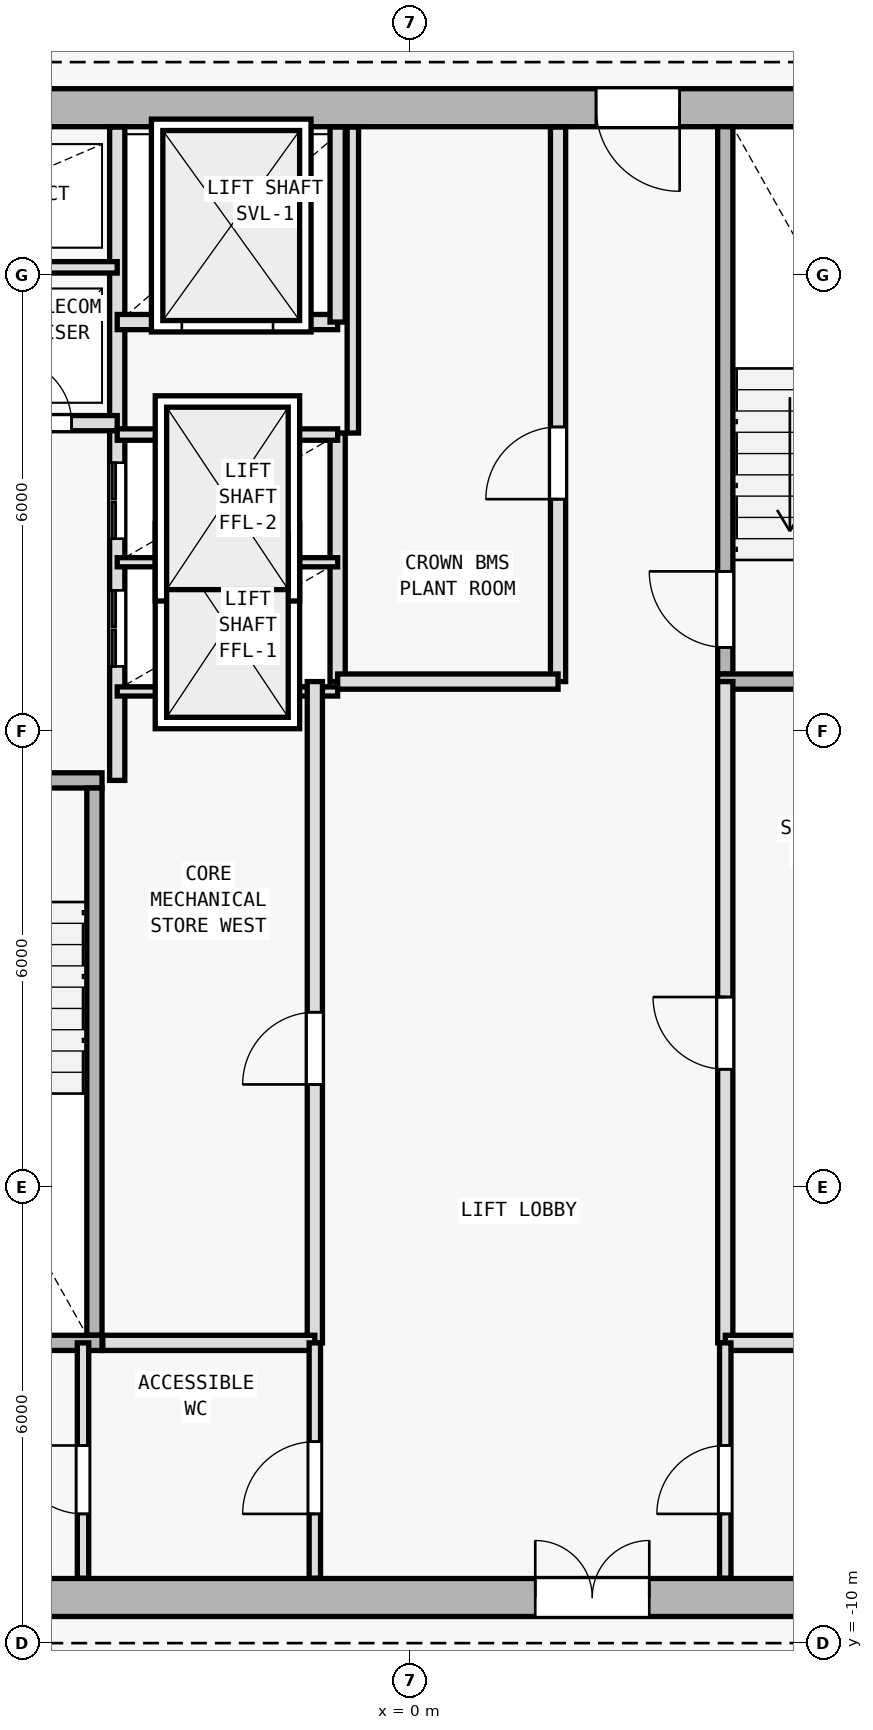
"""IFC4 building model, lengths in metres.
Left out: names, types, materials, properties, quantities, classifications, styles, units other than length and angle.
Written with IfcOpenShell. Run it as: python <this file> out.ifc"""

import sys

from ifc_helpers import new_model, si_unit, direction, frame, frame_2d, origin, origin_2d, place, context, subcontext, project, spatial, rectangle, i_section, extrude, element, fill, save


model = new_model("IFC4")
c1 = context("Model", 3, precision=1e-05, world=origin(), true_north=direction((0.0, 1.0)))
c2 = subcontext(c1, "Body", "Model", "MODEL_VIEW")
j1 = project(units=[si_unit("LENGTHUNIT", "METRE"), si_unit("PLANEANGLEUNIT", "RADIAN")], contexts=[c1])
p1 = place(None, origin())
s1 = spatial("IfcSite", under=j1, at=p1, CompositionType="ELEMENT")
p2 = place(p1, origin())
s2 = spatial("IfcBuilding", under=s1, at=p2, CompositionType="ELEMENT")
p3 = place(p2, frame((0.0, 0.0, 301.2)))
s3 = spatial("IfcBuildingStorey", under=s2, at=p3, CompositionType="ELEMENT", Elevation=301.2)
p4 = place(p3, frame((0.0, -9.4, 0.0), z_axis=(0.0, 0.0, 1.0), x_axis=(1.0, 0.0, 0.0)))
e1 = element("IfcColumn", 1, at=p4, inside=s3, PredefinedType="COLUMN", context=c2, shape_type="SweptSolid", body=[
    extrude(i_section(OverallWidth=0.374, OverallDepth=0.372, WebThickness=0.012, FlangeThickness=0.02, FilletRadius=0.015, at=origin_2d()), origin(), (0.0, 0.0, 1.0), 3.6),
])
p5 = place(p3, frame((-7.95, -9.4, 0.0), z_axis=(0.0, 0.0, 1.0), x_axis=(1.0, 0.0, 0.0)))
e2 = element("IfcWall", 2, at=p5, inside=s3, PredefinedType="SHEAR", context=c2, shape_type="SweptSolid", body=[
    extrude(rectangle(XDim=15.9, YDim=0.5, at=frame_2d((7.95, 0.0))), origin(), (0.0, 0.0, 1.0), 3.34),
])
p6 = place(p5, frame((9.6, 0.0, 0.0)))
e3 = element("IfcOpeningElement", 3, at=p6, cuts=e2, PredefinedType="OPENING", context=c2, shape_type="SweptSolid", body=[
    extrude(rectangle(XDim=1.5, YDim=2.2, at=frame_2d((0.75, 1.1))), frame((0.0, 0.26, 0.0), z_axis=(0.0, -1.0, 0.0), x_axis=(1.0, 0.0, 0.0)), (0.0, 0.0, 1.0), 0.52),
])
p7 = place(p3, frame((7.95, 10.2, 0.0), z_axis=(0.0, 0.0, 1.0), x_axis=(-1.0, 0.0, 0.0)))
e4 = element("IfcWall", 4, at=p7, inside=s3, PredefinedType="SHEAR", context=c2, shape_type="SweptSolid", body=[
    extrude(rectangle(XDim=15.9, YDim=0.5, at=frame_2d((7.95, 0.0))), origin(), (0.0, 0.0, 1.0), 3.34),
])
p8 = place(p7, frame((4.4, 0.0, 0.0)))
e5 = element("IfcOpeningElement", 5, at=p8, cuts=e4, PredefinedType="OPENING", context=c2, shape_type="SweptSolid", body=[
    extrude(rectangle(XDim=1.1, YDim=2.15, at=frame_2d((0.55, 1.075))), frame((0.0, 0.26, 0.0), z_axis=(0.0, -1.0, 0.0), x_axis=(1.0, 0.0, 0.0)), (0.0, 0.0, 1.0), 0.52),
])
p9 = place(p3, frame((-7.45, 1.35, 0.0), z_axis=(0.0, 0.0, 1.0), x_axis=(1.0, 0.0, 0.0)))
e6 = element("IfcWall", 6, at=p9, inside=s3, PredefinedType="SOLIDWALL", context=c2, shape_type="SweptSolid", body=[
    extrude(rectangle(XDim=3.4, YDim=0.2, at=frame_2d((1.7, 0.0))), origin(), (0.0, 0.0, 1.0), 3.34),
])
p10 = place(p9, frame((0.65, 0.0, 0.0)))
e7 = element("IfcOpeningElement", 7, at=p10, cuts=e6, PredefinedType="OPENING", context=c2, shape_type="SweptSolid", body=[
    extrude(rectangle(XDim=1.0, YDim=2.15, at=frame_2d((0.5, 1.075))), frame((0.0, 0.11, 0.0), z_axis=(0.0, -1.0, 0.0), x_axis=(1.0, 0.0, 0.0)), (0.0, 0.0, 1.0), 0.22),
])
p11 = place(p3, frame((-4.15, -5.95, 0.0), z_axis=(0.0, 0.0, 1.0), x_axis=(0.0, 1.0, 0.0)))
e8 = element("IfcWall", 8, at=p11, inside=s3, PredefinedType="SOLIDWALL", context=c2, shape_type="SweptSolid", body=[
    extrude(rectangle(XDim=7.2, YDim=0.2, at=frame_2d((3.6, 0.0))), origin(), (0.0, 0.0, 1.0), 3.34),
])
p12 = place(p3, frame((-3.85, 1.35, 0.0), z_axis=(0.0, 0.0, 1.0), x_axis=(0.0, 1.0, 0.0)))
e9 = element("IfcWall", 9, at=p12, inside=s3, PredefinedType="SOLIDWALL", context=c2, shape_type="SweptSolid", body=[
    extrude(rectangle(XDim=8.595, YDim=0.2, at=frame_2d((4.297, 0.0))), origin(), (0.0, 0.0, 1.0), 3.34),
])
p13 = place(p12, frame((1.5, 0.0, 0.0)))
e10 = element("IfcOpeningElement", 10, at=p13, cuts=e9, PredefinedType="OPENING", context=c2, shape_type="SweptSolid", body=[
    extrude(rectangle(XDim=1.0, YDim=2.15, at=frame_2d((0.5, 1.075))), frame((0.0, 0.11, 0.0), z_axis=(0.0, -1.0, 0.0), x_axis=(1.0, 0.0, 0.0)), (0.0, 0.0, 1.0), 0.22),
])
p14 = place(p12, frame((3.18, 0.0, 0.0)))
e11 = element("IfcOpeningElement", 11, at=p14, cuts=e9, PredefinedType="OPENING", context=c2, shape_type="SweptSolid", body=[
    extrude(rectangle(XDim=1.0, YDim=2.15, at=frame_2d((0.5, 1.075))), frame((0.0, 0.11, 0.0), z_axis=(0.0, -1.0, 0.0), x_axis=(1.0, 0.0, 0.0)), (0.0, 0.0, 1.0), 0.22),
])
p15 = place(p3, frame((-7.445, 6.05, 0.0), z_axis=(0.0, 0.0, 1.0), x_axis=(1.0, 0.0, 0.0)))
e12 = element("IfcWall", 12, at=p15, inside=s3, PredefinedType="SOLIDWALL", context=c2, shape_type="SweptSolid", body=[
    extrude(rectangle(XDim=3.595, YDim=0.2, at=frame_2d((1.797, 0.0))), origin(), (0.0, 0.0, 1.0), 3.34),
])
p16 = place(p15, frame((0.345, 0.0, 0.0)))
e13 = element("IfcOpeningElement", 13, at=p16, cuts=e12, PredefinedType="OPENING", context=c2, shape_type="SweptSolid", body=[
    extrude(rectangle(XDim=0.85, YDim=2.1, at=frame_2d((0.425, 1.05))), frame((0.0, 0.11, 0.0), z_axis=(0.0, -1.0, 0.0), x_axis=(1.0, 0.0, 0.0)), (0.0, 0.0, 1.0), 0.22),
])
p17 = place(p15, frame((2.145, 0.0, 0.0)))
e14 = element("IfcOpeningElement", 14, at=p17, cuts=e12, PredefinedType="OPENING", context=c2, shape_type="SweptSolid", body=[
    extrude(rectangle(XDim=0.85, YDim=2.1, at=frame_2d((0.425, 1.05))), frame((0.0, 0.11, 0.0), z_axis=(0.0, -1.0, 0.0), x_axis=(1.0, 0.0, 0.0)), (0.0, 0.0, 1.0), 0.22),
])
p18 = place(p3, frame((-7.445, 8.1, 0.0), z_axis=(0.0, 0.0, 1.0), x_axis=(1.0, 0.0, 0.0)))
e15 = element("IfcWall", 15, at=p18, inside=s3, PredefinedType="PARTITIONING", context=c2, shape_type="SweptSolid", body=[
    extrude(rectangle(XDim=3.595, YDim=0.15, at=frame_2d((1.797, 0.0))), origin(), (0.0, 0.0, 1.0), 3.34),
])
p19 = place(p3, frame((4.15, 2.75, 0.0), z_axis=(0.0, 0.0, 1.0), x_axis=(0.0, 1.0, 0.0)))
e16 = element("IfcWall", 16, at=p19, inside=s3, PredefinedType="SOLIDWALL", context=c2, shape_type="SweptSolid", body=[
    extrude(rectangle(XDim=7.2, YDim=0.2, at=frame_2d((3.6, 0.0))), origin(), (0.0, 0.0, 1.0), 3.34),
])
p20 = place(p19, frame((0.35, 0.0, 0.0)))
e17 = element("IfcOpeningElement", 17, at=p20, cuts=e16, PredefinedType="OPENING", context=c2, shape_type="SweptSolid", body=[
    extrude(rectangle(XDim=1.0, YDim=2.15, at=frame_2d((0.5, 1.075))), frame((0.0, 0.11, 0.0), z_axis=(0.0, -1.0, 0.0), x_axis=(1.0, 0.0, 0.0)), (0.0, 0.0, 1.0), 0.22),
])
p21 = place(p3, frame((4.05, 2.65, 0.0), z_axis=(0.0, 0.0, 1.0), x_axis=(1.0, 0.0, 0.0)))
e18 = element("IfcWall", 18, at=p21, inside=s3, PredefinedType="SOLIDWALL", context=c2, shape_type="SweptSolid", body=[
    extrude(rectangle(XDim=3.4, YDim=0.2, at=frame_2d((1.7, 0.0))), origin(), (0.0, 0.0, 1.0), 3.34),
])
p22 = place(p3, frame((-0.95, 2.65, 0.0), z_axis=(0.0, 0.0, 1.0), x_axis=(0.0, 1.0, 0.0)))
e19 = element("IfcWall", 19, at=p22, inside=s3, PredefinedType="SOLIDWALL", context=c2, shape_type="SweptSolid", body=[
    extrude(rectangle(XDim=3.27, YDim=0.2, at=frame_2d((1.635, 0.0))), origin(), (0.0, 0.0, 1.0), 3.34),
])
for number, where, z_axis, x_axis in (
    (20, (-3.85, 2.52, 0.0), (0.0, 0.0, 1.0), (1.0, 0.0, 0.0)),
    (21, (-3.85, 4.22, 0.0), (0.0, 0.0, 1.0), (1.0, 0.0, 0.0)),
):
    element("IfcWall", number, at=place(p3, frame(where, z_axis=z_axis, x_axis=x_axis)), inside=s3, PredefinedType="PARTITIONING", context=c2, shape_type="SweptSolid", body=[
        extrude(rectangle(XDim=2.9, YDim=0.12, at=frame_2d((1.45, 0.0))), origin(), (0.0, 0.0, 1.0), 3.34),
    ])
p23 = place(p3, frame((-3.85, 5.9, 0.0), z_axis=(0.0, 0.0, 1.0), x_axis=(1.0, 0.0, 0.0)))
e22 = element("IfcWall", 22, at=p23, inside=s3, PredefinedType="PARTITIONING", context=c2, shape_type="SweptSolid", body=[
    extrude(rectangle(XDim=2.9, YDim=0.15, at=frame_2d((1.45, 0.0))), origin(), (0.0, 0.0, 1.0), 3.34),
])
p24 = place(p3, frame((-3.85, 7.38, 0.0), z_axis=(0.0, 0.0, 1.0), x_axis=(1.0, 0.0, 0.0)))
e23 = element("IfcWall", 23, at=p24, inside=s3, PredefinedType="SOLIDWALL", context=c2, shape_type="SweptSolid", body=[
    extrude(rectangle(XDim=2.9, YDim=0.2, at=frame_2d((1.45, 0.0))), origin(), (0.0, 0.0, 1.0), 3.34),
])
p25 = place(p24, frame((0.85, 0.0, 0.0)))
e24 = element("IfcOpeningElement", 24, at=p25, cuts=e23, PredefinedType="OPENING", context=c2, shape_type="SweptSolid", body=[
    extrude(rectangle(XDim=1.2, YDim=2.2, at=frame_2d((0.6, 1.1))), frame((0.0, 0.11, 0.0), z_axis=(0.0, -1.0, 0.0), x_axis=(1.0, 0.0, 0.0)), (0.0, 0.0, 1.0), 0.22),
])
p26 = place(p3, frame((-0.95, 7.38, 0.0), z_axis=(0.0, 0.0, 1.0), x_axis=(0.0, 1.0, 0.0)))
e25 = element("IfcWall", 25, at=p26, inside=s3, PredefinedType="SOLIDWALL", context=c2, shape_type="SweptSolid", body=[
    extrude(rectangle(XDim=2.565, YDim=0.2, at=frame_2d((1.283, 0.0))), origin(), (0.0, 0.0, 1.0), 3.34),
])
p27 = place(p3, frame((4.15, -6.05, 0.0), z_axis=(0.0, 0.0, 1.0), x_axis=(0.0, 1.0, 0.0)))
e26 = element("IfcWall", 26, at=p27, inside=s3, PredefinedType="SOLIDWALL", context=c2, shape_type="SweptSolid", body=[
    extrude(rectangle(XDim=8.7, YDim=0.2, at=frame_2d((4.35, 0.0))), origin(), (0.0, 0.0, 1.0), 3.34),
])
p28 = place(p27, frame((3.6, 0.0, 0.0)))
e27 = element("IfcOpeningElement", 27, at=p28, cuts=e26, PredefinedType="OPENING", context=c2, shape_type="SweptSolid", body=[
    extrude(rectangle(XDim=0.95, YDim=2.1, at=frame_2d((0.475, 1.05))), frame((0.0, 0.11, 0.0), z_axis=(0.0, -1.0, 0.0), x_axis=(1.0, 0.0, 0.0)), (0.0, 0.0, 1.0), 0.22),
])
p29 = place(p3, frame((-1.25, -6.05, 0.0), z_axis=(0.0, 0.0, 1.0), x_axis=(0.0, 1.0, 0.0)))
e28 = element("IfcWall", 28, at=p29, inside=s3, PredefinedType="SOLIDWALL", context=c2, shape_type="SweptSolid", body=[
    extrude(rectangle(XDim=8.7, YDim=0.2, at=frame_2d((4.35, 0.0))), origin(), (0.0, 0.0, 1.0), 3.34),
])
p30 = place(p29, frame((3.4, 0.0, 0.0)))
e29 = element("IfcOpeningElement", 29, at=p30, cuts=e28, PredefinedType="OPENING", context=c2, shape_type="SweptSolid", body=[
    extrude(rectangle(XDim=0.95, YDim=2.1, at=frame_2d((0.475, 1.05))), frame((0.0, 0.11, 0.0), z_axis=(0.0, -1.0, 0.0), x_axis=(1.0, 0.0, 0.0)), (0.0, 0.0, 1.0), 0.22),
])
p31 = place(p3, frame((1.95, 2.65, 0.0), z_axis=(0.0, 0.0, 1.0), x_axis=(0.0, 1.0, 0.0)))
e30 = element("IfcWall", 30, at=p31, inside=s3, PredefinedType="SOLIDWALL", context=c2, shape_type="SweptSolid", body=[
    extrude(rectangle(XDim=7.295, YDim=0.2, at=frame_2d((3.647, 0.0))), origin(), (0.0, 0.0, 1.0), 3.34),
])
p32 = place(p31, frame((2.4, 0.0, 0.0)))
e31 = element("IfcOpeningElement", 31, at=p32, cuts=e30, PredefinedType="OPENING", context=c2, shape_type="SweptSolid", body=[
    extrude(rectangle(XDim=0.95, YDim=2.1, at=frame_2d((0.475, 1.05))), frame((0.0, 0.11, 0.0), z_axis=(0.0, -1.0, 0.0), x_axis=(1.0, 0.0, 0.0)), (0.0, 0.0, 1.0), 0.22),
])
p33 = place(p3, frame((-0.95, 2.65, 0.0), z_axis=(0.0, 0.0, 1.0), x_axis=(1.0, 0.0, 0.0)))
e32 = element("IfcWall", 32, at=p33, inside=s3, PredefinedType="SOLIDWALL", context=c2, shape_type="SweptSolid", body=[
    extrude(rectangle(XDim=2.9, YDim=0.2, at=frame_2d((1.45, 0.0))), origin(), (0.0, 0.0, 1.0), 3.34),
])
p34 = place(p3, frame((-0.75, 5.92, 0.0), z_axis=(0.0, 0.0, 1.0), x_axis=(0.0, 1.0, 0.0)))
e33 = element("IfcWall", 33, at=p34, inside=s3, PredefinedType="PARTITIONING", context=c2, shape_type="SweptSolid", body=[
    extrude(rectangle(XDim=4.025, YDim=0.15, at=frame_2d((2.013, 0.0))), origin(), (0.0, 0.0, 1.0), 3.34),
])
p35 = place(p3, frame((-7.45, -6.05, 0.0), z_axis=(0.0, 0.0, 1.0), x_axis=(1.0, 0.0, 0.0)))
e34 = element("IfcWall", 34, at=p35, inside=s3, PredefinedType="SOLIDWALL", context=c2, shape_type="SweptSolid", body=[
    extrude(rectangle(XDim=3.4, YDim=0.2, at=frame_2d((1.7, 0.0))), origin(), (0.0, 0.0, 1.0), 3.34),
])
p36 = place(p3, frame((-4.04, -6.05, 0.0), z_axis=(0.0, 0.0, 1.0), x_axis=(1.0, 0.0, 0.0)))
e35 = element("IfcWall", 35, at=p36, inside=s3, PredefinedType="SOLIDWALL", context=c2, shape_type="SweptSolid", body=[
    extrude(rectangle(XDim=2.79, YDim=0.2, at=frame_2d((1.395, 0.0))), origin(), (0.0, 0.0, 1.0), 3.34),
])
p37 = place(p3, frame((4.15, -6.05, 0.0), z_axis=(0.0, 0.0, 1.0), x_axis=(1.0, 0.0, 0.0)))
e36 = element("IfcWall", 36, at=p37, inside=s3, PredefinedType="SOLIDWALL", context=c2, shape_type="SweptSolid", body=[
    extrude(rectangle(XDim=3.295, YDim=0.2, at=frame_2d((1.647, 0.0))), origin(), (0.0, 0.0, 1.0), 3.34),
])
p38 = place(p3, frame((-1.25, -9.145, 0.0), z_axis=(0.0, 0.0, 1.0), x_axis=(0.0, 1.0, 0.0)))
e37 = element("IfcWall", 37, at=p38, inside=s3, PredefinedType="PARTITIONING", context=c2, shape_type="SweptSolid", body=[
    extrude(rectangle(XDim=3.095, YDim=0.15, at=frame_2d((1.547, 0.0))), origin(), (0.0, 0.0, 1.0), 3.34),
])
p39 = place(p38, frame((0.845, 0.0, 0.0)))
e38 = element("IfcOpeningElement", 38, at=p39, cuts=e37, PredefinedType="OPENING", context=c2, shape_type="SweptSolid", body=[
    extrude(rectangle(XDim=0.95, YDim=2.1, at=frame_2d((0.475, 1.05))), frame((0.0, 0.085, 0.0), z_axis=(0.0, -1.0, 0.0), x_axis=(1.0, 0.0, 0.0)), (0.0, 0.0, 1.0), 0.17),
])
p40 = place(p3, frame((4.15, -9.145, 0.0), z_axis=(0.0, 0.0, 1.0), x_axis=(0.0, 1.0, 0.0)))
e39 = element("IfcWall", 39, at=p40, inside=s3, PredefinedType="PARTITIONING", context=c2, shape_type="SweptSolid", body=[
    extrude(rectangle(XDim=3.095, YDim=0.15, at=frame_2d((1.547, 0.0))), origin(), (0.0, 0.0, 1.0), 3.34),
])
p41 = place(p40, frame((0.845, 0.0, 0.0)))
e40 = element("IfcOpeningElement", 40, at=p41, cuts=e39, PredefinedType="OPENING", context=c2, shape_type="SweptSolid", body=[
    extrude(rectangle(XDim=0.9, YDim=2.1, at=frame_2d((0.45, 1.05))), frame((0.0, 0.085, 0.0), z_axis=(0.0, -1.0, 0.0), x_axis=(1.0, 0.0, 0.0)), (0.0, 0.0, 1.0), 0.17),
])
p42 = place(p3, frame((-4.3, -9.145, 0.0), z_axis=(0.0, 0.0, 1.0), x_axis=(0.0, 1.0, 0.0)))
e41 = element("IfcWall", 41, at=p42, inside=s3, PredefinedType="PARTITIONING", context=c2, shape_type="SweptSolid", body=[
    extrude(rectangle(XDim=3.095, YDim=0.15, at=frame_2d((1.547, 0.0))), origin(), (0.0, 0.0, 1.0), 3.34),
])
p43 = place(p42, frame((0.845, 0.0, 0.0)))
e42 = element("IfcOpeningElement", 42, at=p43, cuts=e41, PredefinedType="OPENING", context=c2, shape_type="SweptSolid", body=[
    extrude(rectangle(XDim=0.9, YDim=2.1, at=frame_2d((0.45, 1.05))), frame((0.0, 0.085, 0.0), z_axis=(0.0, -1.0, 0.0), x_axis=(1.0, 0.0, 0.0)), (0.0, 0.0, 1.0), 0.17),
])
p44 = place(p6, origin())
e43 = element("IfcDoor", 43, at=p44, inside=s3, OperationType="DOUBLE_DOOR_SINGLE_SWING", PredefinedType="DOOR", context=c2, shape_type="SweptSolid", body=[
    extrude(rectangle(XDim=1.5, YDim=2.2, at=frame_2d((0.75, 1.1))), frame((0.0, 0.025, 0.0), z_axis=(0.0, -1.0, 0.0), x_axis=(1.0, 0.0, 0.0)), (0.0, 0.0, 1.0), 0.05),
])
fill(e3, e43)
p45 = place(p8, origin())
e44 = element("IfcDoor", 44, at=p45, inside=s3, OperationType="SINGLE_SWING_LEFT", PredefinedType="DOOR", context=c2, shape_type="SweptSolid", body=[
    extrude(rectangle(XDim=1.1, YDim=2.15, at=frame_2d((0.55, 1.075))), frame((0.0, 0.025, 0.0), z_axis=(0.0, -1.0, 0.0), x_axis=(1.0, 0.0, 0.0)), (0.0, 0.0, 1.0), 0.05),
])
fill(e5, e44)
p46 = place(p17, origin())
e45 = element("IfcDoor", 45, at=p46, inside=s3, OperationType="SINGLE_SWING_LEFT", PredefinedType="DOOR", context=c2, shape_type="SweptSolid", body=[
    extrude(rectangle(XDim=0.85, YDim=2.1, at=frame_2d((0.425, 1.05))), frame((0.0, 0.025, 0.0), z_axis=(0.0, -1.0, 0.0), x_axis=(1.0, 0.0, 0.0)), (0.0, 0.0, 1.0), 0.05),
])
fill(e14, e45)
p47 = place(p20, origin())
e46 = element("IfcDoor", 46, at=p47, inside=s3, OperationType="SINGLE_SWING_RIGHT", PredefinedType="DOOR", context=c2, shape_type="SweptSolid", body=[
    extrude(rectangle(XDim=1.0, YDim=2.15, at=frame_2d((0.5, 1.075))), frame((0.0, 0.025, 0.0), z_axis=(0.0, -1.0, 0.0), x_axis=(1.0, 0.0, 0.0)), (0.0, 0.0, 1.0), 0.05),
])
fill(e17, e46)
p48 = place(p25, origin())
e47 = element("IfcDoor", 47, at=p48, inside=s3, OperationType="DOUBLE_DOOR_SLIDING", PredefinedType="DOOR", context=c2, shape_type="SweptSolid", body=[
    extrude(rectangle(XDim=1.2, YDim=2.2, at=frame_2d((0.6, 1.1))), frame((0.0, 0.025, 0.0), z_axis=(0.0, -1.0, 0.0), x_axis=(1.0, 0.0, 0.0)), (0.0, 0.0, 1.0), 0.05),
])
fill(e24, e47)
p49 = place(p28, origin())
e48 = element("IfcDoor", 48, at=p49, inside=s3, OperationType="SINGLE_SWING_RIGHT", PredefinedType="DOOR", context=c2, shape_type="SweptSolid", body=[
    extrude(rectangle(XDim=0.95, YDim=2.1, at=frame_2d((0.475, 1.05))), frame((0.0, 0.025, 0.0), z_axis=(0.0, -1.0, 0.0), x_axis=(1.0, 0.0, 0.0)), (0.0, 0.0, 1.0), 0.05),
])
fill(e27, e48)
p50 = place(p30, origin())
e49 = element("IfcDoor", 49, at=p50, inside=s3, OperationType="SINGLE_SWING_LEFT", PredefinedType="DOOR", context=c2, shape_type="SweptSolid", body=[
    extrude(rectangle(XDim=0.95, YDim=2.1, at=frame_2d((0.475, 1.05))), frame((0.0, 0.025, 0.0), z_axis=(0.0, -1.0, 0.0), x_axis=(1.0, 0.0, 0.0)), (0.0, 0.0, 1.0), 0.05),
])
fill(e29, e49)
p51 = place(p32, origin())
e50 = element("IfcDoor", 50, at=p51, inside=s3, OperationType="SINGLE_SWING_LEFT", PredefinedType="DOOR", context=c2, shape_type="SweptSolid", body=[
    extrude(rectangle(XDim=0.95, YDim=2.1, at=frame_2d((0.475, 1.05))), frame((0.0, 0.025, 0.0), z_axis=(0.0, -1.0, 0.0), x_axis=(1.0, 0.0, 0.0)), (0.0, 0.0, 1.0), 0.05),
])
fill(e31, e50)
p52 = place(p13, origin())
e51 = element("IfcDoor", 51, at=p52, inside=s3, OperationType="DOUBLE_DOOR_SLIDING", PredefinedType="DOOR", context=c2, shape_type="SweptSolid", body=[
    extrude(rectangle(XDim=1.0, YDim=2.15, at=frame_2d((0.5, 1.075))), frame((0.0, 0.025, 0.0), z_axis=(0.0, -1.0, 0.0), x_axis=(1.0, 0.0, 0.0)), (0.0, 0.0, 1.0), 0.05),
])
fill(e10, e51)
p53 = place(p14, origin())
e52 = element("IfcDoor", 52, at=p53, inside=s3, OperationType="DOUBLE_DOOR_SLIDING", PredefinedType="DOOR", context=c2, shape_type="SweptSolid", body=[
    extrude(rectangle(XDim=1.0, YDim=2.15, at=frame_2d((0.5, 1.075))), frame((0.0, 0.025, 0.0), z_axis=(0.0, -1.0, 0.0), x_axis=(1.0, 0.0, 0.0)), (0.0, 0.0, 1.0), 0.05),
])
fill(e11, e52)
p54 = place(p39, origin())
e53 = element("IfcDoor", 53, at=p54, inside=s3, OperationType="SINGLE_SWING_LEFT", PredefinedType="DOOR", context=c2, shape_type="SweptSolid", body=[
    extrude(rectangle(XDim=0.95, YDim=2.1, at=frame_2d((0.475, 1.05))), frame((0.0, 0.025, 0.0), z_axis=(0.0, -1.0, 0.0), x_axis=(1.0, 0.0, 0.0)), (0.0, 0.0, 1.0), 0.05),
])
fill(e38, e53)
p55 = place(p43, origin())
e54 = element("IfcDoor", 54, at=p55, inside=s3, OperationType="SINGLE_SWING_RIGHT", PredefinedType="DOOR", context=c2, shape_type="SweptSolid", body=[
    extrude(rectangle(XDim=0.9, YDim=2.1, at=frame_2d((0.45, 1.05))), frame((0.0, 0.025, 0.0), z_axis=(0.0, -1.0, 0.0), x_axis=(1.0, 0.0, 0.0)), (0.0, 0.0, 1.0), 0.05),
])
fill(e42, e54)
p56 = place(p41, origin())
e55 = element("IfcDoor", 55, at=p56, inside=s3, OperationType="SINGLE_SWING_LEFT", PredefinedType="DOOR", context=c2, shape_type="SweptSolid", body=[
    extrude(rectangle(XDim=0.9, YDim=2.1, at=frame_2d((0.45, 1.05))), frame((0.0, 0.025, 0.0), z_axis=(0.0, -1.0, 0.0), x_axis=(1.0, 0.0, 0.0)), (0.0, 0.0, 1.0), 0.05),
])
fill(e40, e55)
save(model, sys.argv[1])
